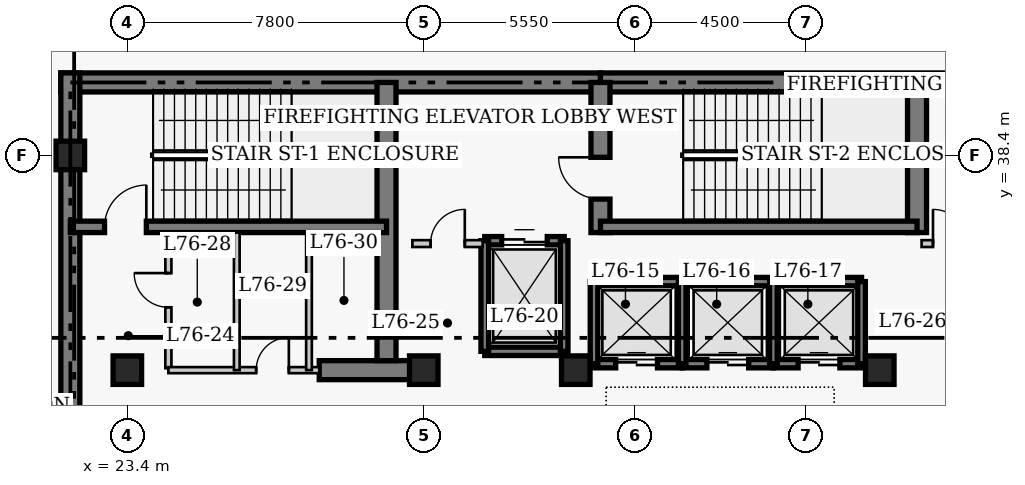
"""IFC4 building model, lengths in metres.
Left out: names, types, materials, properties, quantities, classifications, styles, units other than length and angle.
Written with IfcOpenShell. Run it as: python <this file> out.ifc"""

import sys

from ifc_helpers import new_model, si_unit, direction, frame, frame_2d, origin, origin_2d, place, context, subcontext, project, spatial, rectangle, extrude, element, fill, save


model = new_model("IFC4")
c1 = context("Model", 3, precision=1e-05, world=origin(), true_north=direction((0.0, 1.0)))
c2 = subcontext(c1, "Body", "Model", "MODEL_VIEW")
j1 = project(units=[si_unit("LENGTHUNIT", "METRE"), si_unit("PLANEANGLEUNIT", "RADIAN")], contexts=[c1])
p1 = place(None, origin())
s1 = spatial("IfcSite", under=j1, at=p1, CompositionType="ELEMENT")
p2 = place(p1, origin())
s2 = spatial("IfcBuilding", under=s1, at=p2, CompositionType="ELEMENT")
p3 = place(p2, frame((0.0, 0.0, 306.6)))
s3 = spatial("IfcBuildingStorey", under=s2, at=p3, CompositionType="ELEMENT", Elevation=306.6)
p4 = place(p3, frame((21.65, 40.32, 0.0), z_axis=(0.0, 0.0, 1.0), x_axis=(1.0, 0.0, 0.0)))
e1 = element("IfcWall", 1, at=p4, inside=s3, PredefinedType="SHEAR", context=c2, shape_type="SweptSolid", body=[
    extrude(rectangle(XDim=14.2, YDim=0.5, at=frame_2d((7.1, 0.0))), origin(), (0.0, 0.0, 1.0), 4.8),
])
p5 = place(p3, frame((35.85, 40.32, 0.0), z_axis=(0.0, 0.0, 1.0), x_axis=(1.0, 0.0, 0.0)))
e2 = element("IfcWall", 2, at=p5, inside=s3, PredefinedType="SHEAR", context=c2, shape_type="SweptSolid", body=[
    extrude(rectangle(XDim=12.6, YDim=0.5, at=frame_2d((6.3, 0.0))), origin(), (0.0, 0.0, 1.0), 4.8),
])
p6 = place(p3, frame((21.9, 27.05, 0.0), z_axis=(0.0, 0.0, 1.0), x_axis=(0.0, 1.0, 0.0)))
e3 = element("IfcWall", 3, at=p6, inside=s3, PredefinedType="SHEAR", context=c2, shape_type="SweptSolid", body=[
    extrude(rectangle(XDim=13.52, YDim=0.5, at=frame_2d((6.76, 0.0))), origin(), (0.0, 0.0, 1.0), 4.8),
])
p7 = place(p3, frame((28.45, 32.75, 0.0), z_axis=(0.0, 0.0, 1.0), x_axis=(1.0, 0.0, 0.0)))
e4 = element("IfcWall", 4, at=p7, inside=s3, PredefinedType="SHEAR", context=c2, shape_type="SweptSolid", body=[
    extrude(rectangle(XDim=2.4, YDim=0.5, at=frame_2d((1.2, 0.0))), origin(), (0.0, 0.0, 1.0), 4.8),
])
p8 = place(p3, frame((30.22, 33.0, 0.0), z_axis=(0.0, 0.0, 1.0), x_axis=(0.0, 1.0, 0.0)))
e5 = element("IfcWall", 5, at=p8, inside=s3, PredefinedType="SHEAR", context=c2, shape_type="SweptSolid", body=[
    extrude(rectangle(XDim=7.32, YDim=0.5, at=frame_2d((3.66, 0.0))), origin(), (0.0, 0.0, 1.0), 4.8),
])
p9 = place(p3, frame((35.85, 36.37, 0.0), z_axis=(0.0, 0.0, 1.0), x_axis=(0.0, 1.0, 0.0)))
e6 = element("IfcWall", 6, at=p9, inside=s3, PredefinedType="SHEAR", context=c2, shape_type="SweptSolid", body=[
    extrude(rectangle(XDim=3.95, YDim=0.5, at=frame_2d((1.975, 0.0))), origin(), (0.0, 0.0, 1.0), 4.8),
])
p10 = place(p9, frame((0.88, 0.0, 0.0)))
e7 = element("IfcOpeningElement", 7, at=p10, cuts=e6, PredefinedType="OPENING", context=c2, shape_type="SweptSolid", body=[
    extrude(rectangle(XDim=1.1, YDim=2.15, at=frame_2d((0.55, 1.075))), frame((0.0, 0.26, 0.0), z_axis=(0.0, -1.0, 0.0), x_axis=(1.0, 0.0, 0.0)), (0.0, 0.0, 1.0), 0.52),
])
p11 = place(p3, frame((44.18, 36.37, 0.0), z_axis=(0.0, 0.0, 1.0), x_axis=(0.0, 1.0, 0.0)))
e8 = element("IfcWall", 8, at=p11, inside=s3, PredefinedType="SHEAR", context=c2, shape_type="SweptSolid", body=[
    extrude(rectangle(XDim=3.95, YDim=0.5, at=frame_2d((1.975, 0.0))), origin(), (0.0, 0.0, 1.0), 4.8),
])
p12 = place(p3, frame((21.9, 36.52, 0.0), z_axis=(0.0, 0.0, 1.0), x_axis=(1.0, 0.0, 0.0)))
e9 = element("IfcWall", 9, at=p12, inside=s3, PredefinedType="SHEAR", context=c2, shape_type="SweptSolid", body=[
    extrude(rectangle(XDim=8.32, YDim=0.3, at=frame_2d((4.16, 0.0))), origin(), (0.0, 0.0, 1.0), 4.8),
])
p13 = place(p12, frame((0.9, 0.0, 0.0)))
e10 = element("IfcOpeningElement", 10, at=p13, cuts=e9, PredefinedType="OPENING", context=c2, shape_type="SweptSolid", body=[
    extrude(rectangle(XDim=1.1, YDim=2.15, at=frame_2d((0.55, 1.075))), frame((0.0, 0.16, 0.0), z_axis=(0.0, -1.0, 0.0), x_axis=(1.0, 0.0, 0.0)), (0.0, 0.0, 1.0), 0.32),
])
p14 = place(p3, frame((35.85, 36.52, 0.0), z_axis=(0.0, 0.0, 1.0), x_axis=(1.0, 0.0, 0.0)))
e11 = element("IfcWall", 11, at=p14, inside=s3, PredefinedType="SHEAR", context=c2, shape_type="SweptSolid", body=[
    extrude(rectangle(XDim=8.33, YDim=0.3, at=frame_2d((4.165, 0.0))), origin(), (0.0, 0.0, 1.0), 4.8),
])
for number, where, z_axis, x_axis in (
    (12, (21.9, 38.4, 0.0), (0.0, 0.0, 1.0), (1.0, 0.0, 0.0)),
    (13, (23.4, 32.75, 0.0), (0.0, 0.0, 1.0), (1.0, 0.0, 0.0)),
    (14, (31.2, 32.75, 0.0), (0.0, 0.0, 1.0), (1.0, 0.0, 0.0)),
    (15, (35.2, 32.75, 0.0), (0.0, 0.0, 1.0), (1.0, 0.0, 0.0)),
    (16, (43.2, 32.75, 0.0), (0.0, 0.0, 1.0), (1.0, 0.0, 0.0)),
):
    element("IfcColumn", number, at=place(p3, frame(where, z_axis=z_axis, x_axis=x_axis)), inside=s3, PredefinedType="COLUMN", context=c2, shape_type="SweptSolid", body=[
        extrude(rectangle(XDim=0.75, YDim=0.75, at=origin_2d()), origin(), (0.0, 0.0, 1.0), 4.8),
    ])
p15 = place(p3, frame((35.68, 35.08, 0.0), z_axis=(0.0, 0.0, 1.0), x_axis=(1.0, 0.0, 0.0)))
e17 = element("IfcWall", 17, at=p15, inside=s3, PredefinedType="SHEAR", context=c2, shape_type="SweptSolid", body=[
    extrude(rectangle(XDim=2.32, YDim=0.22, at=frame_2d((1.16, 0.0))), origin(), (0.0, 0.0, 1.0), 4.8),
])
p16 = place(p3, frame((35.68, 32.92, 0.0), z_axis=(0.0, 0.0, 1.0), x_axis=(1.0, 0.0, 0.0)))
e18 = element("IfcWall", 18, at=p16, inside=s3, PredefinedType="SHEAR", context=c2, shape_type="SweptSolid", body=[
    extrude(rectangle(XDim=2.32, YDim=0.22, at=frame_2d((1.16, 0.0))), origin(), (0.0, 0.0, 1.0), 4.8),
])
p17 = place(p16, frame((0.57, 0.0, 0.0)))
e19 = element("IfcOpeningElement", 19, at=p17, cuts=e18, PredefinedType="OPENING", context=c2, shape_type="SweptSolid", body=[
    extrude(rectangle(XDim=1.1, YDim=2.15, at=frame_2d((0.55, 1.075))), frame((0.0, 0.12, 0.0), z_axis=(0.0, -1.0, 0.0), x_axis=(1.0, 0.0, 0.0)), (0.0, 0.0, 1.0), 0.24),
])
p18 = place(p3, frame((35.68, 32.92, 0.0), z_axis=(0.0, 0.0, 1.0), x_axis=(0.0, 1.0, 0.0)))
e20 = element("IfcWall", 20, at=p18, inside=s3, PredefinedType="SHEAR", context=c2, shape_type="SweptSolid", body=[
    extrude(rectangle(XDim=2.16, YDim=0.2, at=frame_2d((1.08, 0.0))), origin(), (0.0, 0.0, 1.0), 4.8),
])
p19 = place(p3, frame((38.0, 35.08, 0.0), z_axis=(0.0, 0.0, 1.0), x_axis=(1.0, 0.0, 0.0)))
e21 = element("IfcWall", 21, at=p19, inside=s3, PredefinedType="SHEAR", context=c2, shape_type="SweptSolid", body=[
    extrude(rectangle(XDim=2.4, YDim=0.22, at=frame_2d((1.2, 0.0))), origin(), (0.0, 0.0, 1.0), 4.8),
])
p20 = place(p3, frame((38.0, 32.92, 0.0), z_axis=(0.0, 0.0, 1.0), x_axis=(1.0, 0.0, 0.0)))
e22 = element("IfcWall", 22, at=p20, inside=s3, PredefinedType="SHEAR", context=c2, shape_type="SweptSolid", body=[
    extrude(rectangle(XDim=2.4, YDim=0.22, at=frame_2d((1.2, 0.0))), origin(), (0.0, 0.0, 1.0), 4.8),
])
p21 = place(p20, frame((0.65, 0.0, 0.0)))
e23 = element("IfcOpeningElement", 23, at=p21, cuts=e22, PredefinedType="OPENING", context=c2, shape_type="SweptSolid", body=[
    extrude(rectangle(XDim=1.1, YDim=2.15, at=frame_2d((0.55, 1.075))), frame((0.0, 0.12, 0.0), z_axis=(0.0, -1.0, 0.0), x_axis=(1.0, 0.0, 0.0)), (0.0, 0.0, 1.0), 0.24),
])
p22 = place(p3, frame((38.0, 32.92, 0.0), z_axis=(0.0, 0.0, 1.0), x_axis=(0.0, 1.0, 0.0)))
e24 = element("IfcWall", 24, at=p22, inside=s3, PredefinedType="SHEAR", context=c2, shape_type="SweptSolid", body=[
    extrude(rectangle(XDim=2.16, YDim=0.2, at=frame_2d((1.08, 0.0))), origin(), (0.0, 0.0, 1.0), 4.8),
])
p23 = place(p3, frame((40.4, 35.08, 0.0), z_axis=(0.0, 0.0, 1.0), x_axis=(1.0, 0.0, 0.0)))
e25 = element("IfcWall", 25, at=p23, inside=s3, PredefinedType="SHEAR", context=c2, shape_type="SweptSolid", body=[
    extrude(rectangle(XDim=2.32, YDim=0.22, at=frame_2d((1.16, 0.0))), origin(), (0.0, 0.0, 1.0), 4.8),
])
p24 = place(p3, frame((40.4, 32.92, 0.0), z_axis=(0.0, 0.0, 1.0), x_axis=(1.0, 0.0, 0.0)))
e26 = element("IfcWall", 26, at=p24, inside=s3, PredefinedType="SHEAR", context=c2, shape_type="SweptSolid", body=[
    extrude(rectangle(XDim=2.32, YDim=0.22, at=frame_2d((1.16, 0.0))), origin(), (0.0, 0.0, 1.0), 4.8),
])
p25 = place(p24, frame((0.65, 0.0, 0.0)))
e27 = element("IfcOpeningElement", 27, at=p25, cuts=e26, PredefinedType="OPENING", context=c2, shape_type="SweptSolid", body=[
    extrude(rectangle(XDim=1.1, YDim=2.15, at=frame_2d((0.55, 1.075))), frame((0.0, 0.12, 0.0), z_axis=(0.0, -1.0, 0.0), x_axis=(1.0, 0.0, 0.0)), (0.0, 0.0, 1.0), 0.24),
])
for number, where, z_axis, x_axis in (
    (28, (40.4, 32.92, 0.0), (0.0, 0.0, 1.0), (0.0, 1.0, 0.0)),
    (29, (42.72, 32.92, 0.0), (0.0, 0.0, 1.0), (0.0, 1.0, 0.0)),
):
    element("IfcWall", number, at=place(p3, frame(where, z_axis=z_axis, x_axis=x_axis)), inside=s3, PredefinedType="SHEAR", context=c2, shape_type="SweptSolid", body=[
        extrude(rectangle(XDim=2.16, YDim=0.2, at=frame_2d((1.08, 0.0))), origin(), (0.0, 0.0, 1.0), 4.8),
    ])
p26 = place(p3, frame((32.805, 36.155, 0.0), z_axis=(0.0, 0.0, 1.0), x_axis=(1.0, 0.0, 0.0)))
e30 = element("IfcWall", 30, at=p26, inside=s3, PredefinedType="SHEAR", context=c2, shape_type="SweptSolid", body=[
    extrude(rectangle(XDim=2.09, YDim=0.22, at=frame_2d((1.045, 0.0))), origin(), (0.0, 0.0, 1.0), 4.8),
])
p27 = place(p26, frame((0.445, 0.0, 0.0)))
e31 = element("IfcOpeningElement", 31, at=p27, cuts=e30, PredefinedType="OPENING", context=c2, shape_type="SweptSolid", body=[
    extrude(rectangle(XDim=1.2, YDim=2.15, at=frame_2d((0.6, 1.075))), frame((0.0, 0.12, 0.0), z_axis=(0.0, -1.0, 0.0), x_axis=(1.0, 0.0, 0.0)), (0.0, 0.0, 1.0), 0.24),
])
p28 = place(p3, frame((32.805, 33.245, 0.0), z_axis=(0.0, 0.0, 1.0), x_axis=(1.0, 0.0, 0.0)))
e32 = element("IfcWall", 32, at=p28, inside=s3, PredefinedType="SHEAR", context=c2, shape_type="SweptSolid", body=[
    extrude(rectangle(XDim=2.09, YDim=0.22, at=frame_2d((1.045, 0.0))), origin(), (0.0, 0.0, 1.0), 4.8),
])
for number, where, z_axis, x_axis in (
    (33, (32.805, 33.245, 0.0), (0.0, 0.0, 1.0), (0.0, 1.0, 0.0)),
    (34, (34.895, 33.245, 0.0), (0.0, 0.0, 1.0), (0.0, 1.0, 0.0)),
):
    element("IfcWall", number, at=place(p3, frame(where, z_axis=z_axis, x_axis=x_axis)), inside=s3, PredefinedType="SHEAR", context=c2, shape_type="SweptSolid", body=[
        extrude(rectangle(XDim=2.91, YDim=0.2, at=frame_2d((1.455, 0.0))), origin(), (0.0, 0.0, 1.0), 4.8),
    ])
p29 = place(p3, frame((30.9, 36.08, 0.0), z_axis=(0.0, 0.0, 1.0), x_axis=(1.0, 0.0, 0.0)))
e35 = element("IfcWall", 35, at=p29, inside=s3, PredefinedType="PARTITIONING", context=c2, shape_type="SweptSolid", body=[
    extrude(rectangle(XDim=1.85, YDim=0.18, at=frame_2d((0.925, 0.0))), origin(), (0.0, 0.0, 1.0), 4.45),
])
p30 = place(p29, frame((0.48, 0.0, 0.0)))
e36 = element("IfcOpeningElement", 36, at=p30, cuts=e35, PredefinedType="OPENING", context=c2, shape_type="SweptSolid", body=[
    extrude(rectangle(XDim=0.9, YDim=2.15, at=frame_2d((0.45, 1.075))), frame((0.0, 0.1, 0.0), z_axis=(0.0, -1.0, 0.0), x_axis=(1.0, 0.0, 0.0)), (0.0, 0.0, 1.0), 0.2),
])
p31 = place(p3, frame((44.3, 36.08, 0.0), z_axis=(0.0, 0.0, 1.0), x_axis=(1.0, 0.0, 0.0)))
e37 = element("IfcWall", 37, at=p31, inside=s3, PredefinedType="PARTITIONING", context=c2, shape_type="SweptSolid", body=[
    extrude(rectangle(XDim=1.5, YDim=0.18, at=frame_2d((0.75, 0.0))), origin(), (0.0, 0.0, 1.0), 4.45),
])
p32 = place(p31, frame((0.3, 0.0, 0.0)))
e38 = element("IfcOpeningElement", 38, at=p32, cuts=e37, PredefinedType="OPENING", context=c2, shape_type="SweptSolid", body=[
    extrude(rectangle(XDim=0.9, YDim=2.15, at=frame_2d((0.45, 1.075))), frame((0.0, 0.1, 0.0), z_axis=(0.0, -1.0, 0.0), x_axis=(1.0, 0.0, 0.0)), (0.0, 0.0, 1.0), 0.2),
])
p33 = place(p3, frame((24.48, 32.8, 0.0), z_axis=(0.0, 0.0, 1.0), x_axis=(0.0, 1.0, 0.0)))
e39 = element("IfcWall", 39, at=p33, inside=s3, PredefinedType="PARTITIONING", context=c2, shape_type="SweptSolid", body=[
    extrude(rectangle(XDim=3.57, YDim=0.16, at=frame_2d((1.785, 0.0))), origin(), (0.0, 0.0, 1.0), 4.45),
])
p34 = place(p33, frame((1.604, 0.0, 0.0)))
e40 = element("IfcOpeningElement", 40, at=p34, cuts=e39, PredefinedType="OPENING", context=c2, shape_type="SweptSolid", body=[
    extrude(rectangle(XDim=0.9, YDim=2.1, at=frame_2d((0.45, 1.05))), frame((0.0, 0.09, 0.0), z_axis=(0.0, -1.0, 0.0), x_axis=(1.0, 0.0, 0.0)), (0.0, 0.0, 1.0), 0.18),
])
p35 = place(p3, frame((24.48, 32.75, 0.0), z_axis=(0.0, 0.0, 1.0), x_axis=(1.0, 0.0, 0.0)))
e41 = element("IfcWall", 41, at=p35, inside=s3, PredefinedType="PARTITIONING", context=c2, shape_type="SweptSolid", body=[
    extrude(rectangle(XDim=3.97, YDim=0.16, at=frame_2d((1.985, 0.0))), origin(), (0.0, 0.0, 1.0), 4.45),
])
p36 = place(p35, frame((2.31, 0.0, 0.0)))
e42 = element("IfcOpeningElement", 42, at=p36, cuts=e41, PredefinedType="OPENING", context=c2, shape_type="SweptSolid", body=[
    extrude(rectangle(XDim=0.86, YDim=2.05, at=frame_2d((0.43, 1.025))), frame((0.0, 0.09, 0.0), z_axis=(0.0, -1.0, 0.0), x_axis=(1.0, 0.0, 0.0)), (0.0, 0.0, 1.0), 0.18),
])
for number, where, z_axis, x_axis in (
    (43, (26.28, 32.75, 0.0), (0.0, 0.0, 1.0), (0.0, 1.0, 0.0)),
    (44, (28.18, 32.75, 0.0), (0.0, 0.0, 1.0), (0.0, 1.0, 0.0)),
):
    element("IfcWall", number, at=place(p3, frame(where, z_axis=z_axis, x_axis=x_axis)), inside=s3, PredefinedType="PARTITIONING", context=c2, shape_type="SweptSolid", body=[
        extrude(rectangle(XDim=3.62, YDim=0.15, at=frame_2d((1.81, 0.0))), origin(), (0.0, 0.0, 1.0), 4.45),
    ])
p37 = place(p17, origin())
e45 = element("IfcDoor", 45, at=p37, inside=s3, OperationType="DOUBLE_DOOR_SLIDING", PredefinedType="DOOR", context=c2, shape_type="SweptSolid", body=[
    extrude(rectangle(XDim=1.1, YDim=2.15, at=frame_2d((0.55, 1.075))), frame((0.0, 0.025, 0.0), z_axis=(0.0, -1.0, 0.0), x_axis=(1.0, 0.0, 0.0)), (0.0, 0.0, 1.0), 0.05),
])
fill(e19, e45)
p38 = place(p21, origin())
e46 = element("IfcDoor", 46, at=p38, inside=s3, OperationType="DOUBLE_DOOR_SLIDING", PredefinedType="DOOR", context=c2, shape_type="SweptSolid", body=[
    extrude(rectangle(XDim=1.1, YDim=2.15, at=frame_2d((0.55, 1.075))), frame((0.0, 0.025, 0.0), z_axis=(0.0, -1.0, 0.0), x_axis=(1.0, 0.0, 0.0)), (0.0, 0.0, 1.0), 0.05),
])
fill(e23, e46)
p39 = place(p25, origin())
e47 = element("IfcDoor", 47, at=p39, inside=s3, OperationType="DOUBLE_DOOR_SLIDING", PredefinedType="DOOR", context=c2, shape_type="SweptSolid", body=[
    extrude(rectangle(XDim=1.1, YDim=2.15, at=frame_2d((0.55, 1.075))), frame((0.0, 0.025, 0.0), z_axis=(0.0, -1.0, 0.0), x_axis=(1.0, 0.0, 0.0)), (0.0, 0.0, 1.0), 0.05),
])
fill(e27, e47)
p40 = place(p27, origin())
e48 = element("IfcDoor", 48, at=p40, inside=s3, OperationType="DOUBLE_DOOR_SLIDING", PredefinedType="DOOR", context=c2, shape_type="SweptSolid", body=[
    extrude(rectangle(XDim=1.2, YDim=2.15, at=frame_2d((0.6, 1.075))), frame((0.0, 0.025, 0.0), z_axis=(0.0, -1.0, 0.0), x_axis=(1.0, 0.0, 0.0)), (0.0, 0.0, 1.0), 0.05),
])
fill(e31, e48)
p41 = place(p30, origin())
e49 = element("IfcDoor", 49, at=p41, inside=s3, OperationType="SINGLE_SWING_RIGHT", PredefinedType="DOOR", context=c2, shape_type="SweptSolid", body=[
    extrude(rectangle(XDim=0.9, YDim=2.15, at=frame_2d((0.45, 1.075))), frame((0.0, 0.025, 0.0), z_axis=(0.0, -1.0, 0.0), x_axis=(1.0, 0.0, 0.0)), (0.0, 0.0, 1.0), 0.05),
])
fill(e36, e49)
p42 = place(p32, origin())
e50 = element("IfcDoor", 50, at=p42, inside=s3, OperationType="SINGLE_SWING_LEFT", PredefinedType="DOOR", context=c2, shape_type="SweptSolid", body=[
    extrude(rectangle(XDim=0.9, YDim=2.15, at=frame_2d((0.45, 1.075))), frame((0.0, 0.025, 0.0), z_axis=(0.0, -1.0, 0.0), x_axis=(1.0, 0.0, 0.0)), (0.0, 0.0, 1.0), 0.05),
])
fill(e38, e50)
p43 = place(p34, origin())
e51 = element("IfcDoor", 51, at=p43, inside=s3, OperationType="SINGLE_SWING_RIGHT", PredefinedType="DOOR", context=c2, shape_type="SweptSolid", body=[
    extrude(rectangle(XDim=0.9, YDim=2.1, at=frame_2d((0.45, 1.05))), frame((0.0, 0.025, 0.0), z_axis=(0.0, -1.0, 0.0), x_axis=(1.0, 0.0, 0.0)), (0.0, 0.0, 1.0), 0.05),
])
fill(e40, e51)
p44 = place(p36, origin())
e52 = element("IfcDoor", 52, at=p44, inside=s3, OperationType="SINGLE_SWING_RIGHT", PredefinedType="DOOR", context=c2, shape_type="SweptSolid", body=[
    extrude(rectangle(XDim=0.86, YDim=2.05, at=frame_2d((0.43, 1.025))), frame((0.0, 0.025, 0.0), z_axis=(0.0, -1.0, 0.0), x_axis=(1.0, 0.0, 0.0)), (0.0, 0.0, 1.0), 0.05),
])
fill(e42, e52)
p45 = place(p13, origin())
e53 = element("IfcDoor", 53, at=p45, inside=s3, OperationType="SINGLE_SWING_RIGHT", PredefinedType="DOOR", context=c2, shape_type="SweptSolid", body=[
    extrude(rectangle(XDim=1.1, YDim=2.15, at=frame_2d((0.55, 1.075))), frame((0.0, 0.025, 0.0), z_axis=(0.0, -1.0, 0.0), x_axis=(1.0, 0.0, 0.0)), (0.0, 0.0, 1.0), 0.05),
])
fill(e10, e53)
p46 = place(p10, origin())
e54 = element("IfcDoor", 54, at=p46, inside=s3, OperationType="SINGLE_SWING_RIGHT", PredefinedType="DOOR", context=c2, shape_type="SweptSolid", body=[
    extrude(rectangle(XDim=1.1, YDim=2.15, at=frame_2d((0.55, 1.075))), frame((0.0, 0.025, 0.0), z_axis=(0.0, -1.0, 0.0), x_axis=(1.0, 0.0, 0.0)), (0.0, 0.0, 1.0), 0.05),
])
fill(e7, e54)
save(model, sys.argv[1])
